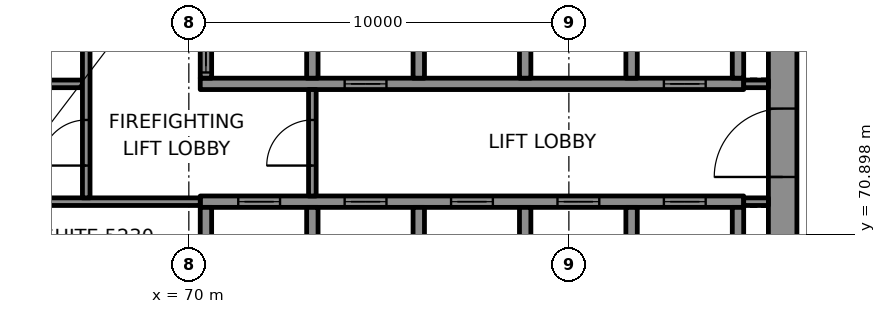
"""IFC4 building model, lengths in metres.
Left out: names, types, materials, properties, quantities, classifications, styles, units other than length and angle.
Written with IfcOpenShell. Run it as: python <this file> out.ifc"""

import sys

from ifc_helpers import new_model, si_unit, direction, frame, frame_2d, origin, place, context, subcontext, project, spatial, rectangle, extrude, element, fill, save


model = new_model("IFC4")
c1 = context("Model", 3, precision=1e-05, world=origin(), true_north=direction((0.0, 1.0)))
c2 = subcontext(c1, "Body", "Model", "MODEL_VIEW")
j1 = project(units=[si_unit("LENGTHUNIT", "METRE"), si_unit("PLANEANGLEUNIT", "RADIAN")], contexts=[c1])
p1 = place(None, origin())
s1 = spatial("IfcSite", under=j1, at=p1, CompositionType="ELEMENT")
p2 = place(p1, origin())
s2 = spatial("IfcBuilding", under=s1, at=p2, CompositionType="ELEMENT")
p3 = place(p2, frame((0.0, 0.0, 222.1)))
s3 = spatial("IfcBuildingStorey", under=s2, at=p3, CompositionType="ELEMENT", Elevation=222.1)
p4 = place(p3, frame((85.625, 67.75, 0.0), z_axis=(0.0, 0.0, 1.0), x_axis=(0.0, 1.0, 0.0)))
e1 = element("IfcWall", 1, at=p4, inside=s3, PredefinedType="SHEAR", context=c2, shape_type="SweptSolid", body=[
    extrude(rectangle(XDim=14.5, YDim=0.75, at=frame_2d((7.25, 0.0))), origin(), (0.0, 0.0, 1.0), 3.7),
])
p5 = place(p4, frame((4.65, 0.0, 0.0)))
e2 = element("IfcOpeningElement", 2, at=p5, cuts=e1, PredefinedType="OPENING", context=c2, shape_type="SweptSolid", body=[
    extrude(rectangle(XDim=1.8, YDim=2.1, at=frame_2d((0.9, 1.05))), frame((0.0, 0.385, 0.0), z_axis=(0.0, -1.0, 0.0), x_axis=(1.0, 0.0, 0.0)), (0.0, 0.0, 1.0), 0.77),
])
p6 = place(p4, frame((11.8, 0.0, 0.0)))
e3 = element("IfcOpeningElement", 3, at=p6, cuts=e1, PredefinedType="OPENING", context=c2, shape_type="SweptSolid", body=[
    extrude(rectangle(XDim=0.9, YDim=2.1, at=frame_2d((0.45, 1.05))), frame((0.0, 0.385, 0.0), z_axis=(0.0, -1.0, 0.0), x_axis=(1.0, 0.0, 0.0)), (0.0, 0.0, 1.0), 0.77),
])
p7 = place(p3, frame((70.3, 71.75, 0.0), z_axis=(0.0, 0.0, 1.0), x_axis=(1.0, 0.0, 0.0)))
e4 = element("IfcWall", 4, at=p7, inside=s3, PredefinedType="SHEAR", context=c2, shape_type="SweptSolid", body=[
    extrude(rectangle(XDim=14.3, YDim=0.3, at=frame_2d((7.15, 0.0))), origin(), (0.0, 0.0, 1.0), 3.7),
])
p8 = place(p7, frame((1.0, 0.0, 0.0)))
e5 = element("IfcOpeningElement", 5, at=p8, cuts=e4, PredefinedType="OPENING", context=c2, shape_type="SweptSolid", body=[
    extrude(rectangle(XDim=1.1, YDim=2.1, at=frame_2d((0.55, 1.05))), frame((0.0, 0.16, 0.0), z_axis=(0.0, -1.0, 0.0), x_axis=(1.0, 0.0, 0.0)), (0.0, 0.0, 1.0), 0.32),
])
p9 = place(p7, frame((3.8, 0.0, 0.0)))
e6 = element("IfcOpeningElement", 6, at=p9, cuts=e4, PredefinedType="OPENING", context=c2, shape_type="SweptSolid", body=[
    extrude(rectangle(XDim=1.1, YDim=2.1, at=frame_2d((0.55, 1.05))), frame((0.0, 0.16, 0.0), z_axis=(0.0, -1.0, 0.0), x_axis=(1.0, 0.0, 0.0)), (0.0, 0.0, 1.0), 0.32),
])
p10 = place(p7, frame((6.6, 0.0, 0.0)))
e7 = element("IfcOpeningElement", 7, at=p10, cuts=e4, PredefinedType="OPENING", context=c2, shape_type="SweptSolid", body=[
    extrude(rectangle(XDim=1.1, YDim=2.1, at=frame_2d((0.55, 1.05))), frame((0.0, 0.16, 0.0), z_axis=(0.0, -1.0, 0.0), x_axis=(1.0, 0.0, 0.0)), (0.0, 0.0, 1.0), 0.32),
])
p11 = place(p7, frame((9.4, 0.0, 0.0)))
e8 = element("IfcOpeningElement", 8, at=p11, cuts=e4, PredefinedType="OPENING", context=c2, shape_type="SweptSolid", body=[
    extrude(rectangle(XDim=1.1, YDim=2.1, at=frame_2d((0.55, 1.05))), frame((0.0, 0.16, 0.0), z_axis=(0.0, -1.0, 0.0), x_axis=(1.0, 0.0, 0.0)), (0.0, 0.0, 1.0), 0.32),
])
p12 = place(p7, frame((12.2, 0.0, 0.0)))
e9 = element("IfcOpeningElement", 9, at=p12, cuts=e4, PredefinedType="OPENING", context=c2, shape_type="SweptSolid", body=[
    extrude(rectangle(XDim=1.1, YDim=2.1, at=frame_2d((0.55, 1.05))), frame((0.0, 0.16, 0.0), z_axis=(0.0, -1.0, 0.0), x_axis=(1.0, 0.0, 0.0)), (0.0, 0.0, 1.0), 0.32),
])
p13 = place(p3, frame((70.3, 74.85, 0.0), z_axis=(0.0, 0.0, 1.0), x_axis=(1.0, 0.0, 0.0)))
e10 = element("IfcWall", 10, at=p13, inside=s3, PredefinedType="SHEAR", context=c2, shape_type="SweptSolid", body=[
    extrude(rectangle(XDim=14.3, YDim=0.3, at=frame_2d((7.15, 0.0))), origin(), (0.0, 0.0, 1.0), 3.7),
])
p14 = place(p13, frame((3.8, 0.0, 0.0)))
e11 = element("IfcOpeningElement", 11, at=p14, cuts=e10, PredefinedType="OPENING", context=c2, shape_type="SweptSolid", body=[
    extrude(rectangle(XDim=1.1, YDim=2.1, at=frame_2d((0.55, 1.05))), frame((0.0, 0.16, 0.0), z_axis=(0.0, -1.0, 0.0), x_axis=(1.0, 0.0, 0.0)), (0.0, 0.0, 1.0), 0.32),
])
p15 = place(p13, frame((12.2, 0.0, 0.0)))
e12 = element("IfcOpeningElement", 12, at=p15, cuts=e10, PredefinedType="OPENING", context=c2, shape_type="SweptSolid", body=[
    extrude(rectangle(XDim=1.1, YDim=2.1, at=frame_2d((0.55, 1.05))), frame((0.0, 0.16, 0.0), z_axis=(0.0, -1.0, 0.0), x_axis=(1.0, 0.0, 0.0)), (0.0, 0.0, 1.0), 0.32),
])
p16 = place(p3, frame((70.45, 69.0, 0.0), z_axis=(0.0, 0.0, 1.0), x_axis=(0.0, 1.0, 0.0)))
e13 = element("IfcWall", 13, at=p16, inside=s3, PredefinedType="SHEAR", context=c2, shape_type="SweptSolid", body=[
    extrude(rectangle(XDim=2.6, YDim=0.3, at=frame_2d((1.3, 0.0))), origin(), (0.0, 0.0, 1.0), 3.7),
])
p17 = place(p3, frame((70.45, 75.0, 0.0), z_axis=(0.0, 0.0, 1.0), x_axis=(0.0, 1.0, 0.0)))
e14 = element("IfcWall", 14, at=p17, inside=s3, PredefinedType="SHEAR", context=c2, shape_type="SweptSolid", body=[
    extrude(rectangle(XDim=2.6, YDim=0.3, at=frame_2d((1.3, 0.0))), origin(), (0.0, 0.0, 1.0), 3.7),
])
p18 = place(p17, frame((0.15, 0.0, 0.0)))
e15 = element("IfcOpeningElement", 15, at=p18, cuts=e14, PredefinedType="OPENING", context=c2, shape_type="SweptSolid", body=[
    extrude(rectangle(XDim=1.1, YDim=2.1, at=frame_2d((0.55, 1.05))), frame((0.0, 0.16, 0.0), z_axis=(0.0, -1.0, 0.0), x_axis=(1.0, 0.0, 0.0)), (0.0, 0.0, 1.0), 0.32),
])
for number, where, z_axis, x_axis in (
    (16, (73.25, 69.0, 0.0), (0.0, 0.0, 1.0), (0.0, 1.0, 0.0)),
    (17, (73.25, 75.0, 0.0), (0.0, 0.0, 1.0), (0.0, 1.0, 0.0)),
    (18, (76.05, 69.0, 0.0), (0.0, 0.0, 1.0), (0.0, 1.0, 0.0)),
    (19, (76.05, 75.0, 0.0), (0.0, 0.0, 1.0), (0.0, 1.0, 0.0)),
    (20, (78.85, 69.0, 0.0), (0.0, 0.0, 1.0), (0.0, 1.0, 0.0)),
    (21, (78.85, 75.0, 0.0), (0.0, 0.0, 1.0), (0.0, 1.0, 0.0)),
    (22, (81.65, 69.0, 0.0), (0.0, 0.0, 1.0), (0.0, 1.0, 0.0)),
    (23, (81.65, 75.0, 0.0), (0.0, 0.0, 1.0), (0.0, 1.0, 0.0)),
    (24, (84.45, 69.0, 0.0), (0.0, 0.0, 1.0), (0.0, 1.0, 0.0)),
    (25, (84.45, 75.0, 0.0), (0.0, 0.0, 1.0), (0.0, 1.0, 0.0)),
):
    element("IfcWall", number, at=place(p3, frame(where, z_axis=z_axis, x_axis=x_axis)), inside=s3, PredefinedType="SHEAR", context=c2, shape_type="SweptSolid", body=[
        extrude(rectangle(XDim=2.6, YDim=0.3, at=frame_2d((1.3, 0.0))), origin(), (0.0, 0.0, 1.0), 3.7),
    ])
p19 = place(p3, frame((64.75, 71.75, 0.0), z_axis=(0.0, 0.0, 1.0), x_axis=(1.0, 0.0, 0.0)))
e26 = element("IfcWall", 26, at=p19, inside=s3, PredefinedType="PARTITIONING", context=c2, shape_type="SweptSolid", body=[
    extrude(rectangle(XDim=5.55, YDim=0.2, at=frame_2d((2.775, 0.0))), origin(), (0.0, 0.0, 1.0), 3.7),
])
p20 = place(p3, frame((84.6, 71.75, 0.0), z_axis=(0.0, 0.0, 1.0), x_axis=(1.0, 0.0, 0.0)))
e27 = element("IfcWall", 27, at=p20, inside=s3, PredefinedType="PARTITIONING", context=c2, shape_type="SweptSolid", body=[
    extrude(rectangle(XDim=0.65, YDim=0.2, at=frame_2d((0.325, 0.0))), origin(), (0.0, 0.0, 1.0), 3.7),
])
p21 = place(p3, frame((64.75, 74.85, 0.0), z_axis=(0.0, 0.0, 1.0), x_axis=(1.0, 0.0, 0.0)))
e28 = element("IfcWall", 28, at=p21, inside=s3, PredefinedType="PARTITIONING", context=c2, shape_type="SweptSolid", body=[
    extrude(rectangle(XDim=2.45, YDim=0.2, at=frame_2d((1.225, 0.0))), origin(), (0.0, 0.0, 1.0), 3.7),
])
p22 = place(p3, frame((84.6, 74.85, 0.0), z_axis=(0.0, 0.0, 1.0), x_axis=(1.0, 0.0, 0.0)))
e29 = element("IfcWall", 29, at=p22, inside=s3, PredefinedType="PARTITIONING", context=c2, shape_type="SweptSolid", body=[
    extrude(rectangle(XDim=0.65, YDim=0.2, at=frame_2d((0.325, 0.0))), origin(), (0.0, 0.0, 1.0), 3.7),
])
p23 = place(p3, frame((67.3, 71.85, 0.0), z_axis=(0.0, 0.0, 1.0), x_axis=(0.0, 1.0, 0.0)))
e30 = element("IfcWall", 30, at=p23, inside=s3, PredefinedType="PARTITIONING", context=c2, shape_type="SweptSolid", body=[
    extrude(rectangle(XDim=5.75, YDim=0.2, at=frame_2d((2.875, 0.0))), origin(), (0.0, 0.0, 1.0), 3.7),
])
p24 = place(p23, frame((0.85, 0.0, 0.0)))
e31 = element("IfcOpeningElement", 31, at=p24, cuts=e30, PredefinedType="OPENING", context=c2, shape_type="SweptSolid", body=[
    extrude(rectangle(XDim=1.2, YDim=2.1, at=frame_2d((0.6, 1.05))), frame((0.0, 0.11, 0.0), z_axis=(0.0, -1.0, 0.0), x_axis=(1.0, 0.0, 0.0)), (0.0, 0.0, 1.0), 0.22),
])
p25 = place(p3, frame((73.25, 71.9, 0.0), z_axis=(0.0, 0.0, 1.0), x_axis=(0.0, 1.0, 0.0)))
e32 = element("IfcWall", 32, at=p25, inside=s3, PredefinedType="PARTITIONING", context=c2, shape_type="SweptSolid", body=[
    extrude(rectangle(XDim=2.8, YDim=0.2, at=frame_2d((1.4, 0.0))), origin(), (0.0, 0.0, 1.0), 3.7),
])
p26 = place(p25, frame((0.8, 0.0, 0.0)))
e33 = element("IfcOpeningElement", 33, at=p26, cuts=e32, PredefinedType="OPENING", context=c2, shape_type="SweptSolid", body=[
    extrude(rectangle(XDim=1.2, YDim=2.1, at=frame_2d((0.6, 1.05))), frame((0.0, 0.11, 0.0), z_axis=(0.0, -1.0, 0.0), x_axis=(1.0, 0.0, 0.0)), (0.0, 0.0, 1.0), 0.22),
])
p27 = place(p8, origin())
e34 = element("IfcDoor", 34, at=p27, inside=s3, OperationType="DOUBLE_DOOR_SLIDING", PredefinedType="DOOR", context=c2, shape_type="SweptSolid", body=[
    extrude(rectangle(XDim=1.1, YDim=2.1, at=frame_2d((0.55, 1.05))), frame((0.0, 0.025, 0.0), z_axis=(0.0, -1.0, 0.0), x_axis=(1.0, 0.0, 0.0)), (0.0, 0.0, 1.0), 0.05),
])
fill(e5, e34)
p28 = place(p9, origin())
e35 = element("IfcDoor", 35, at=p28, inside=s3, OperationType="DOUBLE_DOOR_SLIDING", PredefinedType="DOOR", context=c2, shape_type="SweptSolid", body=[
    extrude(rectangle(XDim=1.1, YDim=2.1, at=frame_2d((0.55, 1.05))), frame((0.0, 0.025, 0.0), z_axis=(0.0, -1.0, 0.0), x_axis=(1.0, 0.0, 0.0)), (0.0, 0.0, 1.0), 0.05),
])
fill(e6, e35)
p29 = place(p10, origin())
e36 = element("IfcDoor", 36, at=p29, inside=s3, OperationType="DOUBLE_DOOR_SLIDING", PredefinedType="DOOR", context=c2, shape_type="SweptSolid", body=[
    extrude(rectangle(XDim=1.1, YDim=2.1, at=frame_2d((0.55, 1.05))), frame((0.0, 0.025, 0.0), z_axis=(0.0, -1.0, 0.0), x_axis=(1.0, 0.0, 0.0)), (0.0, 0.0, 1.0), 0.05),
])
fill(e7, e36)
p30 = place(p11, origin())
e37 = element("IfcDoor", 37, at=p30, inside=s3, OperationType="DOUBLE_DOOR_SLIDING", PredefinedType="DOOR", context=c2, shape_type="SweptSolid", body=[
    extrude(rectangle(XDim=1.1, YDim=2.1, at=frame_2d((0.55, 1.05))), frame((0.0, 0.025, 0.0), z_axis=(0.0, -1.0, 0.0), x_axis=(1.0, 0.0, 0.0)), (0.0, 0.0, 1.0), 0.05),
])
fill(e8, e37)
p31 = place(p12, origin())
e38 = element("IfcDoor", 38, at=p31, inside=s3, OperationType="DOUBLE_DOOR_SLIDING", PredefinedType="DOOR", context=c2, shape_type="SweptSolid", body=[
    extrude(rectangle(XDim=1.1, YDim=2.1, at=frame_2d((0.55, 1.05))), frame((0.0, 0.025, 0.0), z_axis=(0.0, -1.0, 0.0), x_axis=(1.0, 0.0, 0.0)), (0.0, 0.0, 1.0), 0.05),
])
fill(e9, e38)
p32 = place(p18, origin())
e39 = element("IfcDoor", 39, at=p32, inside=s3, OperationType="DOUBLE_DOOR_SLIDING", PredefinedType="DOOR", context=c2, shape_type="SweptSolid", body=[
    extrude(rectangle(XDim=1.1, YDim=2.1, at=frame_2d((0.55, 1.05))), frame((0.0, 0.025, 0.0), z_axis=(0.0, -1.0, 0.0), x_axis=(1.0, 0.0, 0.0)), (0.0, 0.0, 1.0), 0.05),
])
fill(e15, e39)
p33 = place(p14, origin())
e40 = element("IfcDoor", 40, at=p33, inside=s3, OperationType="DOUBLE_DOOR_SLIDING", PredefinedType="DOOR", context=c2, shape_type="SweptSolid", body=[
    extrude(rectangle(XDim=1.1, YDim=2.1, at=frame_2d((0.55, 1.05))), frame((0.0, 0.025, 0.0), z_axis=(0.0, -1.0, 0.0), x_axis=(1.0, 0.0, 0.0)), (0.0, 0.0, 1.0), 0.05),
])
fill(e11, e40)
p34 = place(p15, origin())
e41 = element("IfcDoor", 41, at=p34, inside=s3, OperationType="DOUBLE_DOOR_SLIDING", PredefinedType="DOOR", context=c2, shape_type="SweptSolid", body=[
    extrude(rectangle(XDim=1.1, YDim=2.1, at=frame_2d((0.55, 1.05))), frame((0.0, 0.025, 0.0), z_axis=(0.0, -1.0, 0.0), x_axis=(1.0, 0.0, 0.0)), (0.0, 0.0, 1.0), 0.05),
])
fill(e12, e41)
p35 = place(p26, origin())
e42 = element("IfcDoor", 42, at=p35, inside=s3, OperationType="SINGLE_SWING_LEFT", PredefinedType="DOOR", context=c2, shape_type="SweptSolid", body=[
    extrude(rectangle(XDim=1.2, YDim=2.1, at=frame_2d((0.6, 1.05))), frame((0.0, 0.025, 0.0), z_axis=(0.0, -1.0, 0.0), x_axis=(1.0, 0.0, 0.0)), (0.0, 0.0, 1.0), 0.05),
])
fill(e33, e42)
p36 = place(p24, origin())
e43 = element("IfcDoor", 43, at=p36, inside=s3, OperationType="SINGLE_SWING_RIGHT", PredefinedType="DOOR", context=c2, shape_type="SweptSolid", body=[
    extrude(rectangle(XDim=1.2, YDim=2.1, at=frame_2d((0.6, 1.05))), frame((0.0, 0.025, 0.0), z_axis=(0.0, -1.0, 0.0), x_axis=(1.0, 0.0, 0.0)), (0.0, 0.0, 1.0), 0.05),
])
fill(e31, e43)
p37 = place(p5, origin())
e44 = element("IfcDoor", 44, at=p37, inside=s3, OperationType="SINGLE_SWING_RIGHT", PredefinedType="DOOR", context=c2, shape_type="SweptSolid", body=[
    extrude(rectangle(XDim=1.8, YDim=2.1, at=frame_2d((0.9, 1.05))), frame((0.0, 0.095, 0.0), z_axis=(0.0, -1.0, 0.0), x_axis=(1.0, 0.0, 0.0)), (0.0, 0.0, 1.0), 0.19),
])
fill(e2, e44)
save(model, sys.argv[1])
